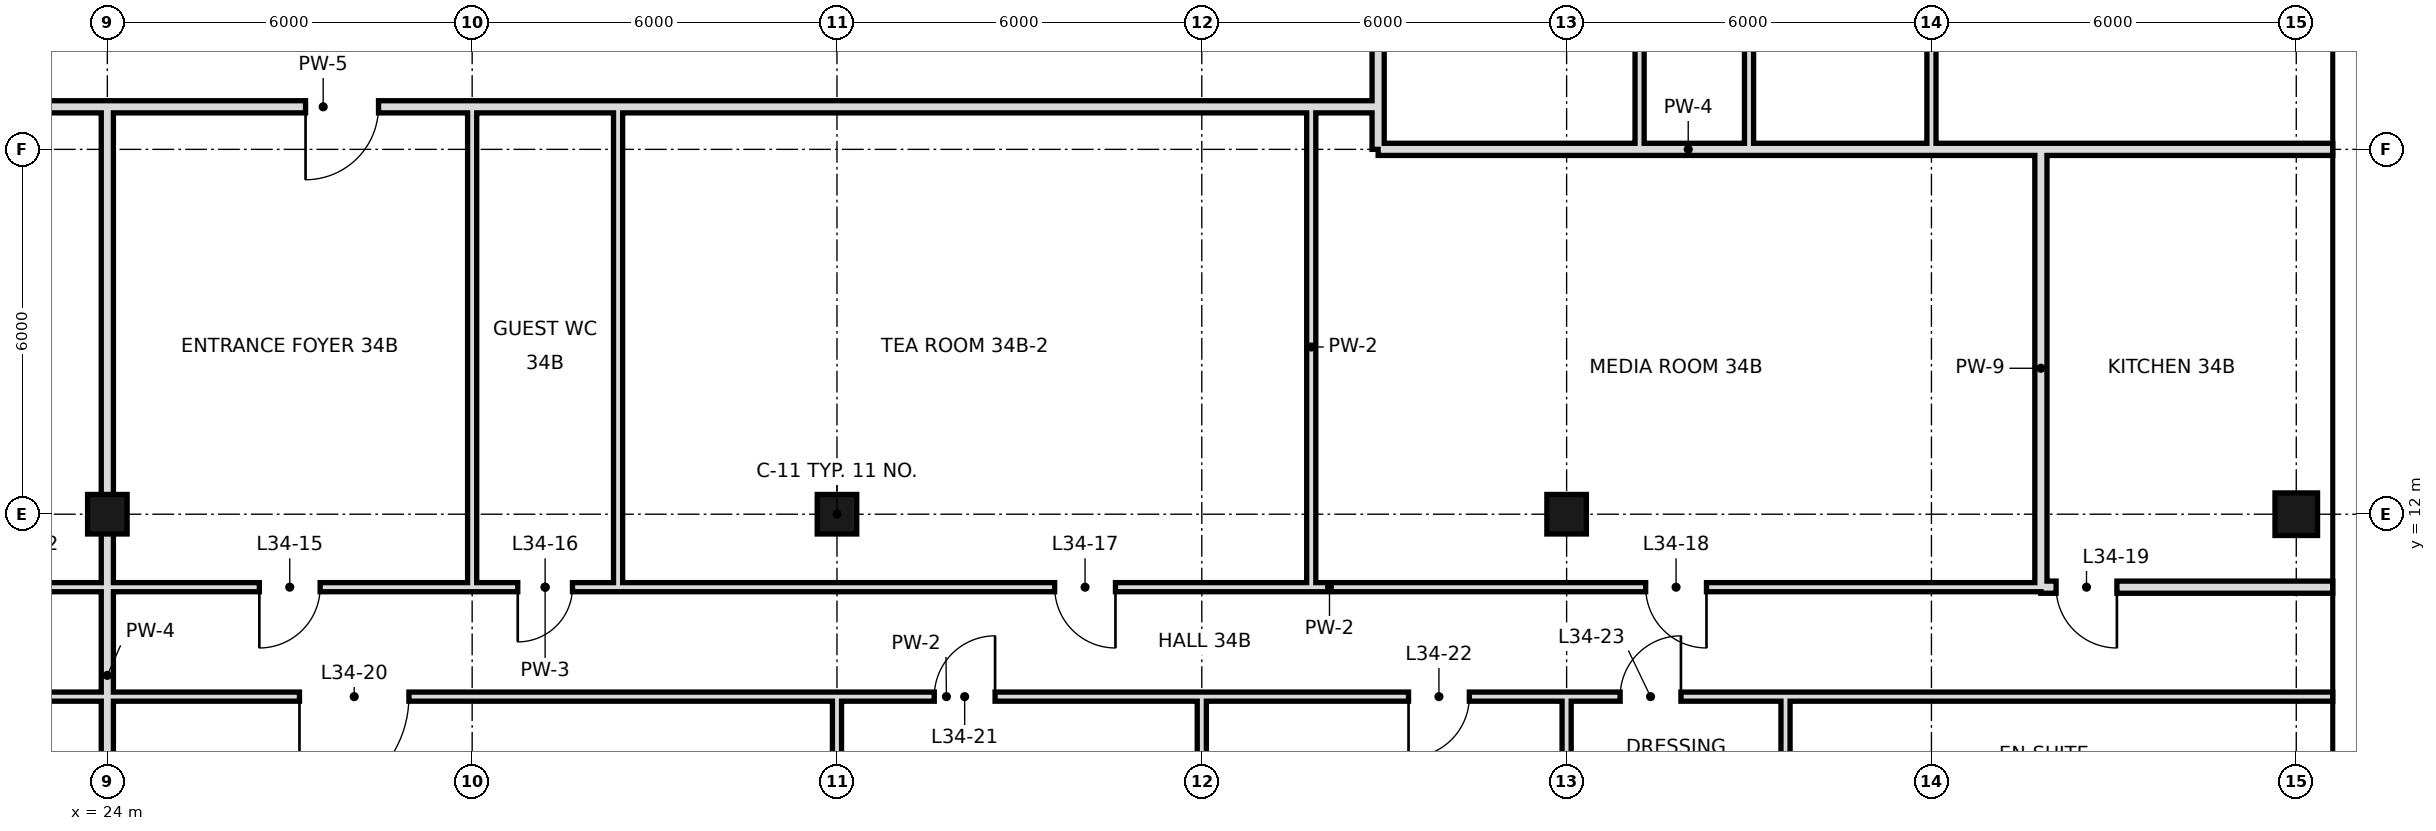
"""IFC4 building model, lengths in metres.
Left out: names, types, materials, properties, quantities, classifications, styles, units other than length and angle.
Written with IfcOpenShell. Run it as: python <this file> out.ifc"""

import sys

from ifc_helpers import new_model, si_unit, direction, frame, frame_2d, origin, origin_2d, place, context, subcontext, project, spatial, rectangle, hollow_rectangle, extrude, element, fill, save


model = new_model("IFC4")
c1 = context("Model", 3, precision=1e-05, world=origin(), true_north=direction((0.0, 1.0)))
c2 = subcontext(c1, "Body", "Model", "MODEL_VIEW")
j1 = project(units=[si_unit("LENGTHUNIT", "METRE"), si_unit("PLANEANGLEUNIT", "RADIAN")], contexts=[c1])
p1 = place(None, origin())
s1 = spatial("IfcSite", under=j1, at=p1, CompositionType="ELEMENT")
p2 = place(p1, origin())
s2 = spatial("IfcBuilding", under=s1, at=p2, CompositionType="ELEMENT")
p3 = place(p2, frame((0.0, 0.0, 151.0)))
s3 = spatial("IfcBuildingStorey", under=s2, at=p3, CompositionType="ELEMENT", Elevation=151.0)
for number, where, z_axis, x_axis in (
    (1, (24.0, 12.0, 0.0), (0.0, 0.0, 1.0), (1.0, 0.0, 0.0)),
    (2, (36.0, 12.0, 0.0), (0.0, 0.0, 1.0), (1.0, 0.0, 0.0)),
    (3, (48.0, 12.0, 0.0), (0.0, 0.0, 1.0), (1.0, 0.0, 0.0)),
):
    element("IfcColumn", number, at=place(p3, frame(where, z_axis=z_axis, x_axis=x_axis)), inside=s3, PredefinedType="COLUMN", context=c2, shape_type="SweptSolid", body=[
        extrude(hollow_rectangle(XDim=0.65, YDim=0.65, WallThickness=0.032, at=origin_2d()), origin(), (0.0, 0.0, 1.0), 3.6),
    ])
p4 = place(p3, frame((60.0, 12.0, 0.0), z_axis=(0.0, 0.0, 1.0), x_axis=(1.0, 0.0, 0.0)))
e4 = element("IfcColumn", 4, at=p4, inside=s3, PredefinedType="COLUMN", context=c2, shape_type="SweptSolid", body=[
    extrude(hollow_rectangle(XDim=0.7, YDim=0.7, WallThickness=0.036, at=origin_2d()), origin(), (0.0, 0.0, 1.0), 3.6),
])
p5 = place(p3, frame((24.0, 0.0, 0.0), z_axis=(0.0, 0.0, 1.0), x_axis=(0.0, 1.0, 0.0)))
e5 = element("IfcWall", 5, at=p5, inside=s3, PredefinedType="SOLIDWALL", context=c2, shape_type="SweptSolid", body=[
    extrude(rectangle(XDim=18.7, YDim=0.2, at=frame_2d((9.35, 0.0))), origin(), (0.0, 0.0, 1.0), 2.72),
])
p6 = place(p3, frame((30.0, 10.8, 0.0), z_axis=(0.0, 0.0, 1.0), x_axis=(0.0, 1.0, 0.0)))
e6 = element("IfcWall", 6, at=p6, inside=s3, PredefinedType="PARTITIONING", context=c2, shape_type="SweptSolid", body=[
    extrude(rectangle(XDim=7.9, YDim=0.15, at=frame_2d((3.95, 0.0))), origin(), (0.0, 0.0, 1.0), 2.72),
])
p7 = place(p3, frame((32.4, 10.8, 0.0), z_axis=(0.0, 0.0, 1.0), x_axis=(0.0, 1.0, 0.0)))
e7 = element("IfcWall", 7, at=p7, inside=s3, PredefinedType="PARTITIONING", context=c2, shape_type="SweptSolid", body=[
    extrude(rectangle(XDim=7.9, YDim=0.15, at=frame_2d((3.95, 0.0))), origin(), (0.0, 0.0, 1.0), 3.42),
])
p8 = place(p3, frame((36.0, 0.0, 0.0), z_axis=(0.0, 0.0, 1.0), x_axis=(0.0, 1.0, 0.0)))
e8 = element("IfcWall", 8, at=p8, inside=s3, PredefinedType="PARTITIONING", context=c2, shape_type="SweptSolid", body=[
    extrude(rectangle(XDim=9.0, YDim=0.15, at=frame_2d((4.5, 0.0))), origin(), (0.0, 0.0, 1.0), 2.72),
])
p9 = place(p3, frame((42.0, -0.6, 0.0), z_axis=(0.0, 0.0, 1.0), x_axis=(0.0, 1.0, 0.0)))
e9 = element("IfcWall", 9, at=p9, inside=s3, PredefinedType="PARTITIONING", context=c2, shape_type="SweptSolid", body=[
    extrude(rectangle(XDim=9.6, YDim=0.15, at=frame_2d((4.8, 0.0))), origin(), (0.0, 0.0, 1.0), 2.72),
])
p10 = place(p3, frame((43.8, 10.8, 0.0), z_axis=(0.0, 0.0, 1.0), x_axis=(0.0, 1.0, 0.0)))
e10 = element("IfcWall", 10, at=p10, inside=s3, PredefinedType="PARTITIONING", context=c2, shape_type="SweptSolid", body=[
    extrude(rectangle(XDim=7.9, YDim=0.15, at=frame_2d((3.95, 0.0))), origin(), (0.0, 0.0, 1.0), 3.42),
])
p11 = place(p3, frame((44.9, 18.7, 0.0), z_axis=(0.0, 0.0, 1.0), x_axis=(0.0, 1.0, 0.0)))
e11 = element("IfcWall", 11, at=p11, inside=s3, PredefinedType="SOLIDWALL", context=c2, shape_type="SweptSolid", body=[
    extrude(rectangle(XDim=7.1, YDim=0.2, at=frame_2d((3.55, 0.0))), origin(), (0.0, 0.0, 1.0), 3.42),
])
p12 = place(p3, frame((44.9, 18.0, 0.0), z_axis=(0.0, 0.0, 1.0), x_axis=(0.0, 1.0, 0.0)))
e12 = element("IfcWall", 12, at=p12, inside=s3, PredefinedType="SOLIDWALL", context=c2, shape_type="SweptSolid", body=[
    extrude(rectangle(XDim=0.7, YDim=0.2, at=frame_2d((0.35, 0.0))), origin(), (0.0, 0.0, 1.0), 2.97),
])
p13 = place(p3, frame((48.0, 0.0, 0.0), z_axis=(0.0, 0.0, 1.0), x_axis=(0.0, 1.0, 0.0)))
e13 = element("IfcWall", 13, at=p13, inside=s3, PredefinedType="PARTITIONING", context=c2, shape_type="SweptSolid", body=[
    extrude(rectangle(XDim=9.0, YDim=0.15, at=frame_2d((4.5, 0.0))), origin(), (0.0, 0.0, 1.0), 2.72),
])
p14 = place(p3, frame((49.2, 18.0, 0.0), z_axis=(0.0, 0.0, 1.0), x_axis=(0.0, 1.0, 0.0)))
e14 = element("IfcWall", 14, at=p14, inside=s3, PredefinedType="PARTITIONING", context=c2, shape_type="SweptSolid", body=[
    extrude(rectangle(XDim=7.8, YDim=0.15, at=frame_2d((3.9, 0.0))), origin(), (0.0, 0.0, 1.0), 3.42),
])
p15 = place(p14, frame((2.14, 0.0, 0.0)))
e15 = element("IfcOpeningElement", 15, at=p15, cuts=e14, PredefinedType="OPENING", context=c2, shape_type="SweptSolid", body=[
    extrude(rectangle(XDim=1.0, YDim=2.4, at=frame_2d((0.5, 1.2))), frame((0.0, 0.085, 0.0), z_axis=(0.0, -1.0, 0.0), x_axis=(1.0, 0.0, 0.0)), (0.0, 0.0, 1.0), 0.17),
])
p16 = place(p3, frame((51.0, 18.0, 0.0), z_axis=(0.0, 0.0, 1.0), x_axis=(0.0, 1.0, 0.0)))
e16 = element("IfcWall", 16, at=p16, inside=s3, PredefinedType="PARTITIONING", context=c2, shape_type="SweptSolid", body=[
    extrude(rectangle(XDim=12.0, YDim=0.15, at=frame_2d((6.0, 0.0))), origin(), (0.0, 0.0, 1.0), 3.42),
])
p17 = place(p16, frame((5.1, 0.0, 0.0)))
e17 = element("IfcOpeningElement", 17, at=p17, cuts=e16, PredefinedType="OPENING", context=c2, shape_type="SweptSolid", body=[
    extrude(rectangle(XDim=1.8, YDim=2.4, at=frame_2d((0.9, 1.2))), frame((0.0, 0.085, 0.0), z_axis=(0.0, -1.0, 0.0), x_axis=(1.0, 0.0, 0.0)), (0.0, 0.0, 1.0), 0.17),
])
p18 = place(p3, frame((51.6, 6.0, 0.0), z_axis=(0.0, 0.0, 1.0), x_axis=(0.0, 1.0, 0.0)))
e18 = element("IfcWall", 18, at=p18, inside=s3, PredefinedType="PARTITIONING", context=c2, shape_type="SweptSolid", body=[
    extrude(rectangle(XDim=3.0, YDim=0.15, at=frame_2d((1.5, 0.0))), origin(), (0.0, 0.0, 1.0), 3.42),
])
p19 = place(p3, frame((54.0, 18.0, 0.0), z_axis=(0.0, 0.0, 1.0), x_axis=(0.0, 1.0, 0.0)))
e19 = element("IfcWall", 19, at=p19, inside=s3, PredefinedType="PARTITIONING", context=c2, shape_type="SweptSolid", body=[
    extrude(rectangle(XDim=12.0, YDim=0.15, at=frame_2d((6.0, 0.0))), origin(), (0.0, 0.0, 1.0), 3.42),
])
p20 = place(p19, frame((3.16, 0.0, 0.0)))
e20 = element("IfcOpeningElement", 20, at=p20, cuts=e19, PredefinedType="OPENING", context=c2, shape_type="SweptSolid", body=[
    extrude(rectangle(XDim=1.8, YDim=2.4, at=frame_2d((0.9, 1.2))), frame((0.0, 0.085, 0.0), z_axis=(0.0, -1.0, 0.0), x_axis=(1.0, 0.0, 0.0)), (0.0, 0.0, 1.0), 0.17),
])
p21 = place(p3, frame((55.8, 10.8, 0.0), z_axis=(0.0, 0.0, 1.0), x_axis=(0.0, 1.0, 0.0)))
e21 = element("IfcWall", 21, at=p21, inside=s3, PredefinedType="SOLIDWALL", context=c2, shape_type="SweptSolid", body=[
    extrude(rectangle(XDim=7.2, YDim=0.2, at=frame_2d((3.6, 0.0))), origin(), (0.0, 0.0, 1.0), 2.72),
])
p22 = place(p3, frame((55.8, 10.8, 0.0), z_axis=(0.0, 0.0, 1.0), x_axis=(1.0, 0.0, 0.0)))
e22 = element("IfcWall", 22, at=p22, inside=s3, PredefinedType="SOLIDWALL", context=c2, shape_type="SweptSolid", body=[
    extrude(rectangle(XDim=4.8, YDim=0.2, at=frame_2d((2.4, 0.0))), origin(), (0.0, 0.0, 1.0), 2.97),
])
p23 = place(p22, frame((0.25, 0.0, 0.0)))
e23 = element("IfcOpeningElement", 23, at=p23, cuts=e22, PredefinedType="OPENING", context=c2, shape_type="SweptSolid", body=[
    extrude(rectangle(XDim=1.0, YDim=2.4, at=frame_2d((0.5, 1.2))), frame((0.0, 0.11, 0.0), z_axis=(0.0, -1.0, 0.0), x_axis=(1.0, 0.0, 0.0)), (0.0, 0.0, 1.0), 0.22),
])
p24 = place(p3, frame((15.6, 10.8, 0.0), z_axis=(0.0, 0.0, 1.0), x_axis=(1.0, 0.0, 0.0)))
e24 = element("IfcWall", 24, at=p24, inside=s3, PredefinedType="PARTITIONING", context=c2, shape_type="SweptSolid", body=[
    extrude(rectangle(XDim=14.4, YDim=0.15, at=frame_2d((7.2, 0.0))), origin(), (0.0, 0.0, 1.0), 3.42),
])
p25 = place(p24, frame((5.08, 0.0, 0.0)))
e25 = element("IfcOpeningElement", 25, at=p25, cuts=e24, PredefinedType="OPENING", context=c2, shape_type="SweptSolid", body=[
    extrude(rectangle(XDim=1.0, YDim=2.4, at=frame_2d((0.5, 1.2))), frame((0.0, 0.085, 0.0), z_axis=(0.0, -1.0, 0.0), x_axis=(1.0, 0.0, 0.0)), (0.0, 0.0, 1.0), 0.17),
])
p26 = place(p24, frame((10.9, 0.0, 0.0)))
e26 = element("IfcOpeningElement", 26, at=p26, cuts=e24, PredefinedType="OPENING", context=c2, shape_type="SweptSolid", body=[
    extrude(rectangle(XDim=1.0, YDim=2.4, at=frame_2d((0.5, 1.2))), frame((0.0, 0.085, 0.0), z_axis=(0.0, -1.0, 0.0), x_axis=(1.0, 0.0, 0.0)), (0.0, 0.0, 1.0), 0.17),
])
p27 = place(p3, frame((32.4, 10.8, 0.0), z_axis=(0.0, 0.0, 1.0), x_axis=(1.0, 0.0, 0.0)))
e27 = element("IfcWall", 27, at=p27, inside=s3, PredefinedType="PARTITIONING", context=c2, shape_type="SweptSolid", body=[
    extrude(rectangle(XDim=23.4, YDim=0.15, at=frame_2d((11.7, 0.0))), origin(), (0.0, 0.0, 1.0), 3.42),
])
p28 = place(p27, frame((7.18, 0.0, 0.0)))
e28 = element("IfcOpeningElement", 28, at=p28, cuts=e27, PredefinedType="OPENING", context=c2, shape_type="SweptSolid", body=[
    extrude(rectangle(XDim=1.0, YDim=2.4, at=frame_2d((0.5, 1.2))), frame((0.0, 0.085, 0.0), z_axis=(0.0, -1.0, 0.0), x_axis=(1.0, 0.0, 0.0)), (0.0, 0.0, 1.0), 0.17),
])
p29 = place(p27, frame((16.9, 0.0, 0.0)))
e29 = element("IfcOpeningElement", 29, at=p29, cuts=e27, PredefinedType="OPENING", context=c2, shape_type="SweptSolid", body=[
    extrude(rectangle(XDim=1.0, YDim=2.4, at=frame_2d((0.5, 1.2))), frame((0.0, 0.085, 0.0), z_axis=(0.0, -1.0, 0.0), x_axis=(1.0, 0.0, 0.0)), (0.0, 0.0, 1.0), 0.17),
])
p30 = place(p3, frame((30.0, 10.8, 0.0), z_axis=(0.0, 0.0, 1.0), x_axis=(1.0, 0.0, 0.0)))
e30 = element("IfcWall", 30, at=p30, inside=s3, PredefinedType="PARTITIONING", context=c2, shape_type="SweptSolid", body=[
    extrude(rectangle(XDim=2.4, YDim=0.15, at=frame_2d((1.2, 0.0))), origin(), (0.0, 0.0, 1.0), 3.42),
])
p31 = place(p30, frame((0.75, 0.0, 0.0)))
e31 = element("IfcOpeningElement", 31, at=p31, cuts=e30, PredefinedType="OPENING", context=c2, shape_type="SweptSolid", body=[
    extrude(rectangle(XDim=0.9, YDim=2.4, at=frame_2d((0.45, 1.2))), frame((0.0, 0.085, 0.0), z_axis=(0.0, -1.0, 0.0), x_axis=(1.0, 0.0, 0.0)), (0.0, 0.0, 1.0), 0.17),
])
p32 = place(p3, frame((55.8, 18.0, 0.0), z_axis=(0.0, 0.0, 1.0), x_axis=(1.0, 0.0, 0.0)))
e32 = element("IfcWall", 32, at=p32, inside=s3, PredefinedType="SOLIDWALL", context=c2, shape_type="SweptSolid", body=[
    extrude(rectangle(XDim=4.8, YDim=0.2, at=frame_2d((2.4, 0.0))), origin(), (0.0, 0.0, 1.0), 2.72),
])
p33 = place(p3, frame((44.9, 18.0, 0.0), z_axis=(0.0, 0.0, 1.0), x_axis=(1.0, 0.0, 0.0)))
e33 = element("IfcWall", 33, at=p33, inside=s3, PredefinedType="SOLIDWALL", context=c2, shape_type="SweptSolid", body=[
    extrude(rectangle(XDim=10.9, YDim=0.2, at=frame_2d((5.45, 0.0))), origin(), (0.0, 0.0, 1.0), 2.72),
])
p34 = place(p3, frame((3.1, 18.7, 0.0), z_axis=(0.0, 0.0, 1.0), x_axis=(1.0, 0.0, 0.0)))
e34 = element("IfcWall", 34, at=p34, inside=s3, PredefinedType="SOLIDWALL", context=c2, shape_type="SweptSolid", body=[
    extrude(rectangle(XDim=41.8, YDim=0.2, at=frame_2d((20.9, 0.0))), origin(), (0.0, 0.0, 1.0), 2.72),
])
p35 = place(p34, frame((5.64, 0.0, 0.0)))
e35 = element("IfcOpeningElement", 35, at=p35, cuts=e34, PredefinedType="OPENING", context=c2, shape_type="SweptSolid", body=[
    extrude(rectangle(XDim=1.2, YDim=2.4, at=frame_2d((0.6, 1.2))), frame((0.0, 0.11, 0.0), z_axis=(0.0, -1.0, 0.0), x_axis=(1.0, 0.0, 0.0)), (0.0, 0.0, 1.0), 0.22),
])
p36 = place(p34, frame((24.16, 0.0, 0.0)))
e36 = element("IfcOpeningElement", 36, at=p36, cuts=e34, PredefinedType="OPENING", context=c2, shape_type="SweptSolid", body=[
    extrude(rectangle(XDim=1.2, YDim=2.4, at=frame_2d((0.6, 1.2))), frame((0.0, 0.11, 0.0), z_axis=(0.0, -1.0, 0.0), x_axis=(1.0, 0.0, 0.0)), (0.0, 0.0, 1.0), 0.22),
])
p37 = place(p3, frame((24.0, 9.0, 0.0), z_axis=(0.0, 0.0, 1.0), x_axis=(1.0, 0.0, 0.0)))
e37 = element("IfcWall", 37, at=p37, inside=s3, PredefinedType="PARTITIONING", context=c2, shape_type="SweptSolid", body=[
    extrude(rectangle(XDim=27.6, YDim=0.15, at=frame_2d((13.8, 0.0))), origin(), (0.0, 0.0, 1.0), 3.42),
])
p38 = place(p37, frame((3.16, 0.0, 0.0)))
e38 = element("IfcOpeningElement", 38, at=p38, cuts=e37, PredefinedType="OPENING", context=c2, shape_type="SweptSolid", body=[
    extrude(rectangle(XDim=1.8, YDim=2.4, at=frame_2d((0.9, 1.2))), frame((0.0, 0.085, 0.0), z_axis=(0.0, -1.0, 0.0), x_axis=(1.0, 0.0, 0.0)), (0.0, 0.0, 1.0), 0.17),
])
p39 = place(p37, frame((13.6, 0.0, 0.0)))
e39 = element("IfcOpeningElement", 39, at=p39, cuts=e37, PredefinedType="OPENING", context=c2, shape_type="SweptSolid", body=[
    extrude(rectangle(XDim=1.0, YDim=2.4, at=frame_2d((0.5, 1.2))), frame((0.0, 0.085, 0.0), z_axis=(0.0, -1.0, 0.0), x_axis=(1.0, 0.0, 0.0)), (0.0, 0.0, 1.0), 0.17),
])
p40 = place(p37, frame((21.4, 0.0, 0.0)))
e40 = element("IfcOpeningElement", 40, at=p40, cuts=e37, PredefinedType="OPENING", context=c2, shape_type="SweptSolid", body=[
    extrude(rectangle(XDim=1.0, YDim=2.4, at=frame_2d((0.5, 1.2))), frame((0.0, 0.085, 0.0), z_axis=(0.0, -1.0, 0.0), x_axis=(1.0, 0.0, 0.0)), (0.0, 0.0, 1.0), 0.17),
])
p41 = place(p37, frame((24.88, 0.0, 0.0)))
e41 = element("IfcOpeningElement", 41, at=p41, cuts=e37, PredefinedType="OPENING", context=c2, shape_type="SweptSolid", body=[
    extrude(rectangle(XDim=1.0, YDim=2.4, at=frame_2d((0.5, 1.2))), frame((0.0, 0.085, 0.0), z_axis=(0.0, -1.0, 0.0), x_axis=(1.0, 0.0, 0.0)), (0.0, 0.0, 1.0), 0.17),
])
p42 = place(p3, frame((21.6, 9.0, 0.0), z_axis=(0.0, 0.0, 1.0), x_axis=(1.0, 0.0, 0.0)))
e42 = element("IfcWall", 42, at=p42, inside=s3, PredefinedType="PARTITIONING", context=c2, shape_type="SweptSolid", body=[
    extrude(rectangle(XDim=2.4, YDim=0.15, at=frame_2d((1.2, 0.0))), origin(), (0.0, 0.0, 1.0), 3.42),
])
p43 = place(p3, frame((51.6, 9.0, 0.0), z_axis=(0.0, 0.0, 1.0), x_axis=(1.0, 0.0, 0.0)))
e43 = element("IfcWall", 43, at=p43, inside=s3, PredefinedType="PARTITIONING", context=c2, shape_type="SweptSolid", body=[
    extrude(rectangle(XDim=9.0, YDim=0.15, at=frame_2d((4.5, 0.0))), origin(), (0.0, 0.0, 1.0), 3.42),
])
p44 = place(p26, frame((1.0, 0.0, 0.0), z_axis=(0.0, 0.0, 1.0), x_axis=(-1.0, 0.0, 0.0)))
e44 = element("IfcDoor", 44, at=p44, inside=s3, OperationType="SINGLE_SWING_RIGHT", PredefinedType="DOOR", context=c2, shape_type="SweptSolid", body=[
    extrude(rectangle(XDim=1.0, YDim=2.4, at=frame_2d((0.5, 1.2))), frame((0.0, 0.025, 0.0), z_axis=(0.0, -1.0, 0.0), x_axis=(1.0, 0.0, 0.0)), (0.0, 0.0, 1.0), 0.05),
])
fill(e26, e44)
p45 = place(p31, frame((0.9, 0.0, 0.0), z_axis=(0.0, 0.0, 1.0), x_axis=(-1.0, 0.0, 0.0)))
e45 = element("IfcDoor", 45, at=p45, inside=s3, OperationType="SINGLE_SWING_RIGHT", PredefinedType="DOOR", context=c2, shape_type="SweptSolid", body=[
    extrude(rectangle(XDim=0.9, YDim=2.4, at=frame_2d((0.45, 1.2))), frame((0.0, 0.025, 0.0), z_axis=(0.0, -1.0, 0.0), x_axis=(1.0, 0.0, 0.0)), (0.0, 0.0, 1.0), 0.05),
])
fill(e31, e45)
p46 = place(p28, origin())
e46 = element("IfcDoor", 46, at=p46, inside=s3, OperationType="SINGLE_SWING_RIGHT", PredefinedType="DOOR", context=c2, shape_type="SweptSolid", body=[
    extrude(rectangle(XDim=1.0, YDim=2.4, at=frame_2d((0.5, 1.2))), frame((0.0, 0.025, 0.0), z_axis=(0.0, -1.0, 0.0), x_axis=(1.0, 0.0, 0.0)), (0.0, 0.0, 1.0), 0.05),
])
fill(e28, e46)
p47 = place(p29, origin())
e47 = element("IfcDoor", 47, at=p47, inside=s3, OperationType="SINGLE_SWING_RIGHT", PredefinedType="DOOR", context=c2, shape_type="SweptSolid", body=[
    extrude(rectangle(XDim=1.0, YDim=2.4, at=frame_2d((0.5, 1.2))), frame((0.0, 0.025, 0.0), z_axis=(0.0, -1.0, 0.0), x_axis=(1.0, 0.0, 0.0)), (0.0, 0.0, 1.0), 0.05),
])
fill(e29, e47)
p48 = place(p23, origin())
e48 = element("IfcDoor", 48, at=p48, inside=s3, OperationType="SINGLE_SWING_RIGHT", PredefinedType="DOOR", context=c2, shape_type="SweptSolid", body=[
    extrude(rectangle(XDim=1.0, YDim=2.4, at=frame_2d((0.5, 1.2))), frame((0.0, 0.025, 0.0), z_axis=(0.0, -1.0, 0.0), x_axis=(1.0, 0.0, 0.0)), (0.0, 0.0, 1.0), 0.05),
])
fill(e23, e48)
p49 = place(p38, frame((1.8, 0.0, 0.0), z_axis=(0.0, 0.0, 1.0), x_axis=(-1.0, 0.0, 0.0)))
e49 = element("IfcDoor", 49, at=p49, inside=s3, OperationType="SINGLE_SWING_RIGHT", PredefinedType="DOOR", context=c2, shape_type="SweptSolid", body=[
    extrude(rectangle(XDim=1.8, YDim=2.4, at=frame_2d((0.9, 1.2))), frame((0.0, 0.025, 0.0), z_axis=(0.0, -1.0, 0.0), x_axis=(1.0, 0.0, 0.0)), (0.0, 0.0, 1.0), 0.05),
])
fill(e38, e49)
p50 = place(p39, frame((1.0, 0.0, 0.0), z_axis=(0.0, 0.0, 1.0), x_axis=(-1.0, 0.0, 0.0)))
e50 = element("IfcDoor", 50, at=p50, inside=s3, OperationType="SINGLE_SWING_LEFT", PredefinedType="DOOR", context=c2, shape_type="SweptSolid", body=[
    extrude(rectangle(XDim=1.0, YDim=2.4, at=frame_2d((0.5, 1.2))), frame((0.0, 0.025, 0.0), z_axis=(0.0, -1.0, 0.0), x_axis=(1.0, 0.0, 0.0)), (0.0, 0.0, 1.0), 0.05),
])
fill(e39, e50)
p51 = place(p40, frame((1.0, 0.0, 0.0), z_axis=(0.0, 0.0, 1.0), x_axis=(-1.0, 0.0, 0.0)))
e51 = element("IfcDoor", 51, at=p51, inside=s3, OperationType="SINGLE_SWING_RIGHT", PredefinedType="DOOR", context=c2, shape_type="SweptSolid", body=[
    extrude(rectangle(XDim=1.0, YDim=2.4, at=frame_2d((0.5, 1.2))), frame((0.0, 0.025, 0.0), z_axis=(0.0, -1.0, 0.0), x_axis=(1.0, 0.0, 0.0)), (0.0, 0.0, 1.0), 0.05),
])
fill(e40, e51)
p52 = place(p41, frame((1.0, 0.0, 0.0), z_axis=(0.0, 0.0, 1.0), x_axis=(-1.0, 0.0, 0.0)))
e52 = element("IfcDoor", 52, at=p52, inside=s3, OperationType="SINGLE_SWING_LEFT", PredefinedType="DOOR", context=c2, shape_type="SweptSolid", body=[
    extrude(rectangle(XDim=1.0, YDim=2.4, at=frame_2d((0.5, 1.2))), frame((0.0, 0.025, 0.0), z_axis=(0.0, -1.0, 0.0), x_axis=(1.0, 0.0, 0.0)), (0.0, 0.0, 1.0), 0.05),
])
fill(e41, e52)
p53 = place(p36, frame((1.2, 0.0, 0.0), z_axis=(0.0, 0.0, 1.0), x_axis=(-1.0, 0.0, 0.0)))
e53 = element("IfcDoor", 53, at=p53, inside=s3, OperationType="SINGLE_SWING_RIGHT", PredefinedType="DOOR", context=c2, shape_type="SweptSolid", body=[
    extrude(rectangle(XDim=1.2, YDim=2.4, at=frame_2d((0.6, 1.2))), frame((0.0, 0.025, 0.0), z_axis=(0.0, -1.0, 0.0), x_axis=(1.0, 0.0, 0.0)), (0.0, 0.0, 1.0), 0.05),
])
fill(e36, e53)
save(model, sys.argv[1])
